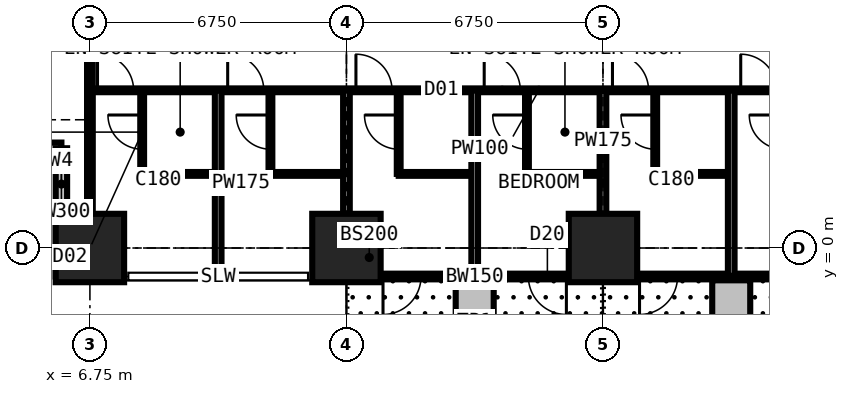
"""IFC4 building model, lengths in metres.
Left out: names, types, materials, properties, quantities, classifications, styles, units other than length and angle.
Written with IfcOpenShell. Run it as: python <this file> out.ifc"""

import sys

from ifc_helpers import new_model, si_unit, direction, frame, frame_2d, origin, origin_2d, place, context, subcontext, project, spatial, rectangle, extrude, element, fill, save


model = new_model("IFC4")
c1 = context("Model", 3, precision=1e-05, world=origin(), true_north=direction((0.0, 1.0)))
c2 = subcontext(c1, "Body", "Model", "MODEL_VIEW")
j1 = project(units=[si_unit("LENGTHUNIT", "METRE"), si_unit("PLANEANGLEUNIT", "RADIAN")], contexts=[c1])
p1 = place(None, origin())
s1 = spatial("IfcSite", under=j1, at=p1, CompositionType="ELEMENT")
p2 = place(p1, origin())
s2 = spatial("IfcBuilding", under=s1, at=p2, CompositionType="ELEMENT")
p3 = place(p2, frame((0.0, 0.0, 46.8)))
s3 = spatial("IfcBuildingStorey", under=s2, at=p3, CompositionType="ELEMENT", Elevation=46.8)
for number, where, z_axis, x_axis in (
    (1, (6.75, 0.0, 0.0), (0.0, 0.0, 1.0), (1.0, 0.0, 0.0)),
    (2, (13.5, 0.0, 0.0), (0.0, 0.0, 1.0), (1.0, 0.0, 0.0)),
    (3, (20.25, 0.0, 0.0), (0.0, 0.0, 1.0), (1.0, 0.0, 0.0)),
):
    element("IfcColumn", number, at=place(p3, frame(where, z_axis=z_axis, x_axis=x_axis)), inside=s3, PredefinedType="COLUMN", context=c2, shape_type="SweptSolid", body=[
        extrude(rectangle(XDim=1.8, YDim=1.8, at=origin_2d()), origin(), (0.0, 0.0, 1.0), 3.6),
    ])
p4 = place(p3, frame((2.625, 2.625, 0.0), z_axis=(0.0, 0.0, 1.0), x_axis=(1.0, 0.0, 0.0)))
e4 = element("IfcWall", 4, at=p4, inside=s3, PredefinedType="SOLIDWALL", context=c2, shape_type="SweptSolid", body=[
    extrude(rectangle(XDim=3.375, YDim=0.3, at=frame_2d((1.688, 0.0))), origin(), (0.0, 0.0, 1.0), 3.375),
])
p5 = place(p4, frame((0.788, 0.0, 0.6)))
e5 = element("IfcOpeningElement", 5, at=p5, cuts=e4, PredefinedType="OPENING", context=c2, shape_type="SweptSolid", body=[
    extrude(rectangle(XDim=1.8, YDim=2.1, at=frame_2d((0.9, 1.05))), frame((0.0, 0.16, 0.0), z_axis=(0.0, -1.0, 0.0), x_axis=(1.0, 0.0, 0.0)), (0.0, 0.0, 1.0), 0.32),
])
p6 = place(p3, frame((6.0, 2.625, 0.0), z_axis=(0.0, 0.0, 1.0), x_axis=(0.0, -1.0, 0.0)))
e6 = element("IfcWall", 6, at=p6, inside=s3, PredefinedType="SOLIDWALL", context=c2, shape_type="SweptSolid", body=[
    extrude(rectangle(XDim=3.375, YDim=0.3, at=frame_2d((1.688, 0.0))), origin(), (0.0, 0.0, 1.0), 3.375),
])
p7 = place(p6, frame((0.343, 0.0, 0.9)))
e7 = element("IfcOpeningElement", 7, at=p7, cuts=e6, PredefinedType="OPENING", context=c2, shape_type="SweptSolid", body=[
    extrude(rectangle(XDim=1.2, YDim=1.8, at=frame_2d((0.6, 0.9))), frame((0.0, 0.16, 0.0), z_axis=(0.0, -1.0, 0.0), x_axis=(1.0, 0.0, 0.0)), (0.0, 0.0, 1.0), 0.32),
])
p8 = place(p3, frame((20.25, -0.75, 0.0), z_axis=(0.0, 0.0, 1.0), x_axis=(-1.0, 0.0, 0.0)))
e8 = element("IfcWall", 8, at=p8, inside=s3, PredefinedType="SOLIDWALL", context=c2, shape_type="SweptSolid", body=[
    extrude(rectangle(XDim=6.75, YDim=0.15, at=frame_2d((3.375, 0.0))), origin(), (0.0, 0.0, 1.0), 3.375),
])
p9 = place(p8, frame((0.962, 0.0, 0.0)))
e9 = element("IfcOpeningElement", 9, at=p9, cuts=e8, PredefinedType="OPENING", context=c2, shape_type="SweptSolid", body=[
    extrude(rectangle(XDim=1.0, YDim=2.2, at=frame_2d((0.5, 1.1))), frame((0.0, 0.085, 0.0), z_axis=(0.0, -1.0, 0.0), x_axis=(1.0, 0.0, 0.0)), (0.0, 0.0, 1.0), 0.17),
])
p10 = place(p8, frame((2.025, 0.0, 0.9)))
e10 = element("IfcOpeningElement", 10, at=p10, cuts=e8, PredefinedType="OPENING", context=c2, shape_type="SweptSolid", body=[
    extrude(rectangle(XDim=1.2, YDim=1.8, at=frame_2d((0.6, 0.9))), frame((0.0, 0.085, 0.0), z_axis=(0.0, -1.0, 0.0), x_axis=(1.0, 0.0, 0.0)), (0.0, 0.0, 1.0), 0.17),
])
p11 = place(p8, frame((4.788, 0.0, 0.0)))
e11 = element("IfcOpeningElement", 11, at=p11, cuts=e8, PredefinedType="OPENING", context=c2, shape_type="SweptSolid", body=[
    extrude(rectangle(XDim=1.0, YDim=2.2, at=frame_2d((0.5, 1.1))), frame((0.0, 0.085, 0.0), z_axis=(0.0, -1.0, 0.0), x_axis=(1.0, 0.0, 0.0)), (0.0, 0.0, 1.0), 0.17),
])
p12 = place(p8, frame((3.525, 0.0, 0.9)))
e12 = element("IfcOpeningElement", 12, at=p12, cuts=e8, PredefinedType="OPENING", context=c2, shape_type="SweptSolid", body=[
    extrude(rectangle(XDim=1.2, YDim=1.8, at=frame_2d((0.6, 0.9))), frame((0.0, 0.085, 0.0), z_axis=(0.0, -1.0, 0.0), x_axis=(1.0, 0.0, 0.0)), (0.0, 0.0, 1.0), 0.17),
])
p13 = place(p3, frame((27.0, -0.75, 0.0), z_axis=(0.0, 0.0, 1.0), x_axis=(-1.0, 0.0, 0.0)))
e13 = element("IfcWall", 13, at=p13, inside=s3, PredefinedType="SOLIDWALL", context=c2, shape_type="SweptSolid", body=[
    extrude(rectangle(XDim=6.75, YDim=0.15, at=frame_2d((3.375, 0.0))), origin(), (0.0, 0.0, 1.0), 3.375),
])
p14 = place(p13, frame((0.962, 0.0, 0.0)))
e14 = element("IfcOpeningElement", 14, at=p14, cuts=e13, PredefinedType="OPENING", context=c2, shape_type="SweptSolid", body=[
    extrude(rectangle(XDim=1.0, YDim=2.2, at=frame_2d((0.5, 1.1))), frame((0.0, 0.085, 0.0), z_axis=(0.0, -1.0, 0.0), x_axis=(1.0, 0.0, 0.0)), (0.0, 0.0, 1.0), 0.17),
])
p15 = place(p13, frame((2.025, 0.0, 0.9)))
e15 = element("IfcOpeningElement", 15, at=p15, cuts=e13, PredefinedType="OPENING", context=c2, shape_type="SweptSolid", body=[
    extrude(rectangle(XDim=1.2, YDim=1.8, at=frame_2d((0.6, 0.9))), frame((0.0, 0.085, 0.0), z_axis=(0.0, -1.0, 0.0), x_axis=(1.0, 0.0, 0.0)), (0.0, 0.0, 1.0), 0.17),
])
p16 = place(p13, frame((4.788, 0.0, 0.0)))
e16 = element("IfcOpeningElement", 16, at=p16, cuts=e13, PredefinedType="OPENING", context=c2, shape_type="SweptSolid", body=[
    extrude(rectangle(XDim=1.0, YDim=2.2, at=frame_2d((0.5, 1.1))), frame((0.0, 0.085, 0.0), z_axis=(0.0, -1.0, 0.0), x_axis=(1.0, 0.0, 0.0)), (0.0, 0.0, 1.0), 0.17),
])
p17 = place(p13, frame((3.525, 0.0, 0.9)))
e17 = element("IfcOpeningElement", 17, at=p17, cuts=e13, PredefinedType="OPENING", context=c2, shape_type="SweptSolid", body=[
    extrude(rectangle(XDim=1.2, YDim=1.8, at=frame_2d((0.6, 0.9))), frame((0.0, 0.085, 0.0), z_axis=(0.0, -1.0, 0.0), x_axis=(1.0, 0.0, 0.0)), (0.0, 0.0, 1.0), 0.17),
])
for number, where, z_axis, x_axis in (
    (18, (16.875, -0.85, 0.0), (0.0, 0.0, 1.0), (0.0, -1.0, 0.0)),
    (19, (23.625, -0.85, 0.0), (0.0, 0.0, 1.0), (0.0, -1.0, 0.0)),
):
    element("IfcWall", number, at=place(p3, frame(where, z_axis=z_axis, x_axis=x_axis)), inside=s3, PredefinedType="USERDEFINED", context=c2, shape_type="SweptSolid", body=[
        extrude(rectangle(XDim=2.2, YDim=1.0, at=frame_2d((1.1, 0.0))), origin(), (0.0, 0.0, 1.0), 0.9),
    ])
p18 = place(p3, frame((6.75, -0.734, 0.0), z_axis=(0.0, 0.0, 1.0), x_axis=(0.0, 1.0, 0.0)))
e20 = element("IfcWall", 20, at=p18, inside=s3, PredefinedType="PARTITIONING", context=c2, shape_type="SweptSolid", body=[
    extrude(rectangle(XDim=10.859, YDim=0.15, at=frame_2d((5.429, 0.0))), origin(), (0.0, 0.0, 1.0), 2.877),
])
p19 = place(p3, frame((6.75, 4.15, 0.0), z_axis=(0.0, 0.0, 1.0), x_axis=(1.0, 0.0, 0.0)))
e21 = element("IfcWall", 21, at=p19, inside=s3, PredefinedType="PARTITIONING", context=c2, shape_type="SweptSolid", body=[
    extrude(rectangle(XDim=23.625, YDim=0.1, at=frame_2d((11.812, 0.0))), origin(), (0.0, 0.0, 1.0), 3.375),
])
p20 = place(p19, frame((0.2, 0.0, 0.0)))
e22 = element("IfcOpeningElement", 22, at=p20, cuts=e21, PredefinedType="OPENING", context=c2, shape_type="SweptSolid", body=[
    extrude(rectangle(XDim=0.95, YDim=2.2, at=frame_2d((0.475, 1.1))), frame((0.0, 0.06, 0.0), z_axis=(0.0, -1.0, 0.0), x_axis=(1.0, 0.0, 0.0)), (0.0, 0.0, 1.0), 0.12),
])
p21 = place(p19, frame((3.625, 0.0, 0.0)))
e23 = element("IfcOpeningElement", 23, at=p21, cuts=e21, PredefinedType="OPENING", context=c2, shape_type="SweptSolid", body=[
    extrude(rectangle(XDim=0.95, YDim=2.2, at=frame_2d((0.475, 1.1))), frame((0.0, 0.06, 0.0), z_axis=(0.0, -1.0, 0.0), x_axis=(1.0, 0.0, 0.0)), (0.0, 0.0, 1.0), 0.12),
])
p22 = place(p19, frame((7.0, 0.0, 0.0)))
e24 = element("IfcOpeningElement", 24, at=p22, cuts=e21, PredefinedType="OPENING", context=c2, shape_type="SweptSolid", body=[
    extrude(rectangle(XDim=0.95, YDim=2.2, at=frame_2d((0.475, 1.1))), frame((0.0, 0.06, 0.0), z_axis=(0.0, -1.0, 0.0), x_axis=(1.0, 0.0, 0.0)), (0.0, 0.0, 1.0), 0.12),
])
p23 = place(p19, frame((10.375, 0.0, 0.0)))
e25 = element("IfcOpeningElement", 25, at=p23, cuts=e21, PredefinedType="OPENING", context=c2, shape_type="SweptSolid", body=[
    extrude(rectangle(XDim=0.95, YDim=2.2, at=frame_2d((0.475, 1.1))), frame((0.0, 0.06, 0.0), z_axis=(0.0, -1.0, 0.0), x_axis=(1.0, 0.0, 0.0)), (0.0, 0.0, 1.0), 0.12),
])
p24 = place(p19, frame((13.75, 0.0, 0.0)))
e26 = element("IfcOpeningElement", 26, at=p24, cuts=e21, PredefinedType="OPENING", context=c2, shape_type="SweptSolid", body=[
    extrude(rectangle(XDim=0.95, YDim=2.2, at=frame_2d((0.475, 1.1))), frame((0.0, 0.06, 0.0), z_axis=(0.0, -1.0, 0.0), x_axis=(1.0, 0.0, 0.0)), (0.0, 0.0, 1.0), 0.12),
])
p25 = place(p19, frame((17.125, 0.0, 0.0)))
e27 = element("IfcOpeningElement", 27, at=p25, cuts=e21, PredefinedType="OPENING", context=c2, shape_type="SweptSolid", body=[
    extrude(rectangle(XDim=0.95, YDim=2.2, at=frame_2d((0.475, 1.1))), frame((0.0, 0.06, 0.0), z_axis=(0.0, -1.0, 0.0), x_axis=(1.0, 0.0, 0.0)), (0.0, 0.0, 1.0), 0.12),
])
p26 = place(p19, frame((20.5, 0.0, 0.0)))
e28 = element("IfcOpeningElement", 28, at=p26, cuts=e21, PredefinedType="OPENING", context=c2, shape_type="SweptSolid", body=[
    extrude(rectangle(XDim=0.95, YDim=2.2, at=frame_2d((0.475, 1.1))), frame((0.0, 0.06, 0.0), z_axis=(0.0, -1.0, 0.0), x_axis=(1.0, 0.0, 0.0)), (0.0, 0.0, 1.0), 0.12),
])
p27 = place(p3, frame((8.125, 1.95, 0.0), z_axis=(0.0, 0.0, 1.0), x_axis=(0.0, 1.0, 0.0)))
e29 = element("IfcWall", 29, at=p27, inside=s3, PredefinedType="PARTITIONING", context=c2, shape_type="SweptSolid", body=[
    extrude(rectangle(XDim=2.2, YDim=0.1, at=frame_2d((1.1, 0.0))), origin(), (0.0, 0.0, 1.0), 3.375),
])
p28 = place(p27, frame((0.65, 0.0, 0.0)))
e30 = element("IfcOpeningElement", 30, at=p28, cuts=e29, PredefinedType="OPENING", context=c2, shape_type="SweptSolid", body=[
    extrude(rectangle(XDim=0.9, YDim=2.2, at=frame_2d((0.45, 1.1))), frame((0.0, 0.06, 0.0), z_axis=(0.0, -1.0, 0.0), x_axis=(1.0, 0.0, 0.0)), (0.0, 0.0, 1.0), 0.12),
])
p29 = place(p3, frame((8.125, 1.95, 0.0), z_axis=(0.0, 0.0, 1.0), x_axis=(1.0, 0.0, 0.0)))
e31 = element("IfcWall", 31, at=p29, inside=s3, PredefinedType="PARTITIONING", context=c2, shape_type="SweptSolid", body=[
    extrude(rectangle(XDim=2.0, YDim=0.1, at=frame_2d((1.0, 0.0))), origin(), (0.0, 0.0, 1.0), 3.375),
])
p30 = place(p3, frame((10.125, -0.734, 0.0), z_axis=(0.0, 0.0, 1.0), x_axis=(0.0, 1.0, 0.0)))
e32 = element("IfcWall", 32, at=p30, inside=s3, PredefinedType="PARTITIONING", context=c2, shape_type="SweptSolid", body=[
    extrude(rectangle(XDim=4.884, YDim=0.175, at=frame_2d((2.442, 0.0))), origin(), (0.0, 0.0, 1.0), 3.375),
])
p31 = place(p3, frame((11.5, 1.95, 0.0), z_axis=(0.0, 0.0, 1.0), x_axis=(0.0, 1.0, 0.0)))
e33 = element("IfcWall", 33, at=p31, inside=s3, PredefinedType="PARTITIONING", context=c2, shape_type="SweptSolid", body=[
    extrude(rectangle(XDim=2.2, YDim=0.1, at=frame_2d((1.1, 0.0))), origin(), (0.0, 0.0, 1.0), 3.375),
])
p32 = place(p31, frame((0.65, 0.0, 0.0)))
e34 = element("IfcOpeningElement", 34, at=p32, cuts=e33, PredefinedType="OPENING", context=c2, shape_type="SweptSolid", body=[
    extrude(rectangle(XDim=0.9, YDim=2.2, at=frame_2d((0.45, 1.1))), frame((0.0, 0.06, 0.0), z_axis=(0.0, -1.0, 0.0), x_axis=(1.0, 0.0, 0.0)), (0.0, 0.0, 1.0), 0.12),
])
p33 = place(p3, frame((11.5, 1.95, 0.0), z_axis=(0.0, 0.0, 1.0), x_axis=(1.0, 0.0, 0.0)))
e35 = element("IfcWall", 35, at=p33, inside=s3, PredefinedType="PARTITIONING", context=c2, shape_type="SweptSolid", body=[
    extrude(rectangle(XDim=2.0, YDim=0.1, at=frame_2d((1.0, 0.0))), origin(), (0.0, 0.0, 1.0), 3.375),
])
p34 = place(p3, frame((13.5, -0.734, 0.0), z_axis=(0.0, 0.0, 1.0), x_axis=(0.0, 1.0, 0.0)))
e36 = element("IfcWall", 36, at=p34, inside=s3, PredefinedType="PARTITIONING", context=c2, shape_type="SweptSolid", body=[
    extrude(rectangle(XDim=4.884, YDim=0.175, at=frame_2d((2.442, 0.0))), origin(), (0.0, 0.0, 1.0), 2.877),
])
p35 = place(p3, frame((14.875, 1.95, 0.0), z_axis=(0.0, 0.0, 1.0), x_axis=(0.0, 1.0, 0.0)))
e37 = element("IfcWall", 37, at=p35, inside=s3, PredefinedType="PARTITIONING", context=c2, shape_type="SweptSolid", body=[
    extrude(rectangle(XDim=2.2, YDim=0.1, at=frame_2d((1.1, 0.0))), origin(), (0.0, 0.0, 1.0), 3.375),
])
p36 = place(p35, frame((0.65, 0.0, 0.0)))
e38 = element("IfcOpeningElement", 38, at=p36, cuts=e37, PredefinedType="OPENING", context=c2, shape_type="SweptSolid", body=[
    extrude(rectangle(XDim=0.9, YDim=2.2, at=frame_2d((0.45, 1.1))), frame((0.0, 0.06, 0.0), z_axis=(0.0, -1.0, 0.0), x_axis=(1.0, 0.0, 0.0)), (0.0, 0.0, 1.0), 0.12),
])
p37 = place(p3, frame((14.875, 1.95, 0.0), z_axis=(0.0, 0.0, 1.0), x_axis=(1.0, 0.0, 0.0)))
e39 = element("IfcWall", 39, at=p37, inside=s3, PredefinedType="PARTITIONING", context=c2, shape_type="SweptSolid", body=[
    extrude(rectangle(XDim=2.0, YDim=0.1, at=frame_2d((1.0, 0.0))), origin(), (0.0, 0.0, 1.0), 3.375),
])
p38 = place(p3, frame((16.875, -0.734, 0.0), z_axis=(0.0, 0.0, 1.0), x_axis=(0.0, 1.0, 0.0)))
e40 = element("IfcWall", 40, at=p38, inside=s3, PredefinedType="PARTITIONING", context=c2, shape_type="SweptSolid", body=[
    extrude(rectangle(XDim=4.884, YDim=0.175, at=frame_2d((2.442, 0.0))), origin(), (0.0, 0.0, 1.0), 3.375),
])
p39 = place(p3, frame((18.25, 1.95, 0.0), z_axis=(0.0, 0.0, 1.0), x_axis=(0.0, 1.0, 0.0)))
e41 = element("IfcWall", 41, at=p39, inside=s3, PredefinedType="PARTITIONING", context=c2, shape_type="SweptSolid", body=[
    extrude(rectangle(XDim=2.2, YDim=0.1, at=frame_2d((1.1, 0.0))), origin(), (0.0, 0.0, 1.0), 3.375),
])
p40 = place(p39, frame((0.65, 0.0, 0.0)))
e42 = element("IfcOpeningElement", 42, at=p40, cuts=e41, PredefinedType="OPENING", context=c2, shape_type="SweptSolid", body=[
    extrude(rectangle(XDim=0.9, YDim=2.2, at=frame_2d((0.45, 1.1))), frame((0.0, 0.06, 0.0), z_axis=(0.0, -1.0, 0.0), x_axis=(1.0, 0.0, 0.0)), (0.0, 0.0, 1.0), 0.12),
])
p41 = place(p3, frame((18.25, 1.95, 0.0), z_axis=(0.0, 0.0, 1.0), x_axis=(1.0, 0.0, 0.0)))
e43 = element("IfcWall", 43, at=p41, inside=s3, PredefinedType="PARTITIONING", context=c2, shape_type="SweptSolid", body=[
    extrude(rectangle(XDim=2.0, YDim=0.1, at=frame_2d((1.0, 0.0))), origin(), (0.0, 0.0, 1.0), 3.375),
])
p42 = place(p3, frame((20.25, -0.734, 0.0), z_axis=(0.0, 0.0, 1.0), x_axis=(0.0, 1.0, 0.0)))
e44 = element("IfcWall", 44, at=p42, inside=s3, PredefinedType="PARTITIONING", context=c2, shape_type="SweptSolid", body=[
    extrude(rectangle(XDim=4.884, YDim=0.175, at=frame_2d((2.442, 0.0))), origin(), (0.0, 0.0, 1.0), 2.61),
])
p43 = place(p3, frame((21.625, 1.95, 0.0), z_axis=(0.0, 0.0, 1.0), x_axis=(0.0, 1.0, 0.0)))
e45 = element("IfcWall", 45, at=p43, inside=s3, PredefinedType="PARTITIONING", context=c2, shape_type="SweptSolid", body=[
    extrude(rectangle(XDim=2.2, YDim=0.1, at=frame_2d((1.1, 0.0))), origin(), (0.0, 0.0, 1.0), 3.375),
])
p44 = place(p43, frame((0.65, 0.0, 0.0)))
e46 = element("IfcOpeningElement", 46, at=p44, cuts=e45, PredefinedType="OPENING", context=c2, shape_type="SweptSolid", body=[
    extrude(rectangle(XDim=0.9, YDim=2.2, at=frame_2d((0.45, 1.1))), frame((0.0, 0.06, 0.0), z_axis=(0.0, -1.0, 0.0), x_axis=(1.0, 0.0, 0.0)), (0.0, 0.0, 1.0), 0.12),
])
p45 = place(p3, frame((21.625, 1.95, 0.0), z_axis=(0.0, 0.0, 1.0), x_axis=(1.0, 0.0, 0.0)))
e47 = element("IfcWall", 47, at=p45, inside=s3, PredefinedType="PARTITIONING", context=c2, shape_type="SweptSolid", body=[
    extrude(rectangle(XDim=2.0, YDim=0.1, at=frame_2d((1.0, 0.0))), origin(), (0.0, 0.0, 1.0), 3.375),
])
p46 = place(p3, frame((23.625, -0.734, 0.0), z_axis=(0.0, 0.0, 1.0), x_axis=(0.0, 1.0, 0.0)))
e48 = element("IfcWall", 48, at=p46, inside=s3, PredefinedType="PARTITIONING", context=c2, shape_type="SweptSolid", body=[
    extrude(rectangle(XDim=4.884, YDim=0.175, at=frame_2d((2.442, 0.0))), origin(), (0.0, 0.0, 1.0), 3.375),
])
p47 = place(p7, origin())
e49 = element("IfcWindow", 49, at=p47, inside=s3, PartitioningType="SINGLE_PANEL", PredefinedType="WINDOW", context=c2, shape_type="SweptSolid", body=[
    extrude(rectangle(XDim=1.2, YDim=1.8, at=frame_2d((0.6, 0.9))), frame((0.0, 0.03, 0.0), z_axis=(0.0, -1.0, 0.0), x_axis=(1.0, 0.0, 0.0)), (0.0, 0.0, 1.0), 0.06),
])
fill(e7, e49)
p48 = place(p9, origin())
e50 = element("IfcDoor", 50, at=p48, inside=s3, OperationType="SINGLE_SWING_LEFT", PredefinedType="DOOR", context=c2, shape_type="SweptSolid", body=[
    extrude(rectangle(XDim=1.0, YDim=2.2, at=frame_2d((0.5, 1.1))), frame((0.0, 0.025, 0.0), z_axis=(0.0, -1.0, 0.0), x_axis=(1.0, 0.0, 0.0)), (0.0, 0.0, 1.0), 0.05),
])
fill(e9, e50)
p49 = place(p10, origin())
e51 = element("IfcWindow", 51, at=p49, inside=s3, PartitioningType="SINGLE_PANEL", PredefinedType="WINDOW", context=c2, shape_type="SweptSolid", body=[
    extrude(rectangle(XDim=1.2, YDim=1.8, at=frame_2d((0.6, 0.9))), frame((0.0, 0.03, 0.0), z_axis=(0.0, -1.0, 0.0), x_axis=(1.0, 0.0, 0.0)), (0.0, 0.0, 1.0), 0.06),
])
fill(e10, e51)
p50 = place(p11, origin())
e52 = element("IfcDoor", 52, at=p50, inside=s3, OperationType="SINGLE_SWING_RIGHT", PredefinedType="DOOR", context=c2, shape_type="SweptSolid", body=[
    extrude(rectangle(XDim=1.0, YDim=2.2, at=frame_2d((0.5, 1.1))), frame((0.0, 0.025, 0.0), z_axis=(0.0, -1.0, 0.0), x_axis=(1.0, 0.0, 0.0)), (0.0, 0.0, 1.0), 0.05),
])
fill(e11, e52)
p51 = place(p12, origin())
e53 = element("IfcWindow", 53, at=p51, inside=s3, PartitioningType="SINGLE_PANEL", PredefinedType="WINDOW", context=c2, shape_type="SweptSolid", body=[
    extrude(rectangle(XDim=1.2, YDim=1.8, at=frame_2d((0.6, 0.9))), frame((0.0, 0.03, 0.0), z_axis=(0.0, -1.0, 0.0), x_axis=(1.0, 0.0, 0.0)), (0.0, 0.0, 1.0), 0.06),
])
fill(e12, e53)
p52 = place(p15, origin())
e54 = element("IfcWindow", 54, at=p52, inside=s3, PartitioningType="SINGLE_PANEL", PredefinedType="WINDOW", context=c2, shape_type="SweptSolid", body=[
    extrude(rectangle(XDim=1.2, YDim=1.8, at=frame_2d((0.6, 0.9))), frame((0.0, 0.03, 0.0), z_axis=(0.0, -1.0, 0.0), x_axis=(1.0, 0.0, 0.0)), (0.0, 0.0, 1.0), 0.06),
])
fill(e15, e54)
p53 = place(p16, origin())
e55 = element("IfcDoor", 55, at=p53, inside=s3, OperationType="SINGLE_SWING_RIGHT", PredefinedType="DOOR", context=c2, shape_type="SweptSolid", body=[
    extrude(rectangle(XDim=1.0, YDim=2.2, at=frame_2d((0.5, 1.1))), frame((0.0, 0.025, 0.0), z_axis=(0.0, -1.0, 0.0), x_axis=(1.0, 0.0, 0.0)), (0.0, 0.0, 1.0), 0.05),
])
fill(e16, e55)
p54 = place(p17, origin())
e56 = element("IfcWindow", 56, at=p54, inside=s3, PartitioningType="SINGLE_PANEL", PredefinedType="WINDOW", context=c2, shape_type="SweptSolid", body=[
    extrude(rectangle(XDim=1.2, YDim=1.8, at=frame_2d((0.6, 0.9))), frame((0.0, 0.03, 0.0), z_axis=(0.0, -1.0, 0.0), x_axis=(1.0, 0.0, 0.0)), (0.0, 0.0, 1.0), 0.06),
])
fill(e17, e56)
p55 = place(p20, origin())
e57 = element("IfcDoor", 57, at=p55, inside=s3, OperationType="SINGLE_SWING_LEFT", PredefinedType="DOOR", context=c2, shape_type="SweptSolid", body=[
    extrude(rectangle(XDim=0.95, YDim=2.2, at=frame_2d((0.475, 1.1))), frame((0.0, 0.025, 0.0), z_axis=(0.0, -1.0, 0.0), x_axis=(1.0, 0.0, 0.0)), (0.0, 0.0, 1.0), 0.05),
])
fill(e22, e57)
p56 = place(p28, origin())
e58 = element("IfcDoor", 58, at=p56, inside=s3, OperationType="SINGLE_SWING_RIGHT", PredefinedType="DOOR", context=c2, shape_type="SweptSolid", body=[
    extrude(rectangle(XDim=0.9, YDim=2.2, at=frame_2d((0.45, 1.1))), frame((0.0, 0.025, 0.0), z_axis=(0.0, -1.0, 0.0), x_axis=(1.0, 0.0, 0.0)), (0.0, 0.0, 1.0), 0.05),
])
fill(e30, e58)
p57 = place(p21, origin())
e59 = element("IfcDoor", 59, at=p57, inside=s3, OperationType="SINGLE_SWING_LEFT", PredefinedType="DOOR", context=c2, shape_type="SweptSolid", body=[
    extrude(rectangle(XDim=0.95, YDim=2.2, at=frame_2d((0.475, 1.1))), frame((0.0, 0.025, 0.0), z_axis=(0.0, -1.0, 0.0), x_axis=(1.0, 0.0, 0.0)), (0.0, 0.0, 1.0), 0.05),
])
fill(e23, e59)
p58 = place(p32, origin())
e60 = element("IfcDoor", 60, at=p58, inside=s3, OperationType="SINGLE_SWING_RIGHT", PredefinedType="DOOR", context=c2, shape_type="SweptSolid", body=[
    extrude(rectangle(XDim=0.9, YDim=2.2, at=frame_2d((0.45, 1.1))), frame((0.0, 0.025, 0.0), z_axis=(0.0, -1.0, 0.0), x_axis=(1.0, 0.0, 0.0)), (0.0, 0.0, 1.0), 0.05),
])
fill(e34, e60)
p59 = place(p22, origin())
e61 = element("IfcDoor", 61, at=p59, inside=s3, OperationType="SINGLE_SWING_LEFT", PredefinedType="DOOR", context=c2, shape_type="SweptSolid", body=[
    extrude(rectangle(XDim=0.95, YDim=2.2, at=frame_2d((0.475, 1.1))), frame((0.0, 0.025, 0.0), z_axis=(0.0, -1.0, 0.0), x_axis=(1.0, 0.0, 0.0)), (0.0, 0.0, 1.0), 0.05),
])
fill(e24, e61)
p60 = place(p36, origin())
e62 = element("IfcDoor", 62, at=p60, inside=s3, OperationType="SINGLE_SWING_RIGHT", PredefinedType="DOOR", context=c2, shape_type="SweptSolid", body=[
    extrude(rectangle(XDim=0.9, YDim=2.2, at=frame_2d((0.45, 1.1))), frame((0.0, 0.025, 0.0), z_axis=(0.0, -1.0, 0.0), x_axis=(1.0, 0.0, 0.0)), (0.0, 0.0, 1.0), 0.05),
])
fill(e38, e62)
p61 = place(p23, origin())
e63 = element("IfcDoor", 63, at=p61, inside=s3, OperationType="SINGLE_SWING_LEFT", PredefinedType="DOOR", context=c2, shape_type="SweptSolid", body=[
    extrude(rectangle(XDim=0.95, YDim=2.2, at=frame_2d((0.475, 1.1))), frame((0.0, 0.025, 0.0), z_axis=(0.0, -1.0, 0.0), x_axis=(1.0, 0.0, 0.0)), (0.0, 0.0, 1.0), 0.05),
])
fill(e25, e63)
p62 = place(p40, origin())
e64 = element("IfcDoor", 64, at=p62, inside=s3, OperationType="SINGLE_SWING_RIGHT", PredefinedType="DOOR", context=c2, shape_type="SweptSolid", body=[
    extrude(rectangle(XDim=0.9, YDim=2.2, at=frame_2d((0.45, 1.1))), frame((0.0, 0.025, 0.0), z_axis=(0.0, -1.0, 0.0), x_axis=(1.0, 0.0, 0.0)), (0.0, 0.0, 1.0), 0.05),
])
fill(e42, e64)
p63 = place(p24, origin())
e65 = element("IfcDoor", 65, at=p63, inside=s3, OperationType="SINGLE_SWING_LEFT", PredefinedType="DOOR", context=c2, shape_type="SweptSolid", body=[
    extrude(rectangle(XDim=0.95, YDim=2.2, at=frame_2d((0.475, 1.1))), frame((0.0, 0.025, 0.0), z_axis=(0.0, -1.0, 0.0), x_axis=(1.0, 0.0, 0.0)), (0.0, 0.0, 1.0), 0.05),
])
fill(e26, e65)
p64 = place(p44, origin())
e66 = element("IfcDoor", 66, at=p64, inside=s3, OperationType="SINGLE_SWING_RIGHT", PredefinedType="DOOR", context=c2, shape_type="SweptSolid", body=[
    extrude(rectangle(XDim=0.9, YDim=2.2, at=frame_2d((0.45, 1.1))), frame((0.0, 0.025, 0.0), z_axis=(0.0, -1.0, 0.0), x_axis=(1.0, 0.0, 0.0)), (0.0, 0.0, 1.0), 0.05),
])
fill(e46, e66)
p65 = place(p25, origin())
e67 = element("IfcDoor", 67, at=p65, inside=s3, OperationType="SINGLE_SWING_LEFT", PredefinedType="DOOR", context=c2, shape_type="SweptSolid", body=[
    extrude(rectangle(XDim=0.95, YDim=2.2, at=frame_2d((0.475, 1.1))), frame((0.0, 0.025, 0.0), z_axis=(0.0, -1.0, 0.0), x_axis=(1.0, 0.0, 0.0)), (0.0, 0.0, 1.0), 0.05),
])
fill(e27, e67)
save(model, sys.argv[1])
